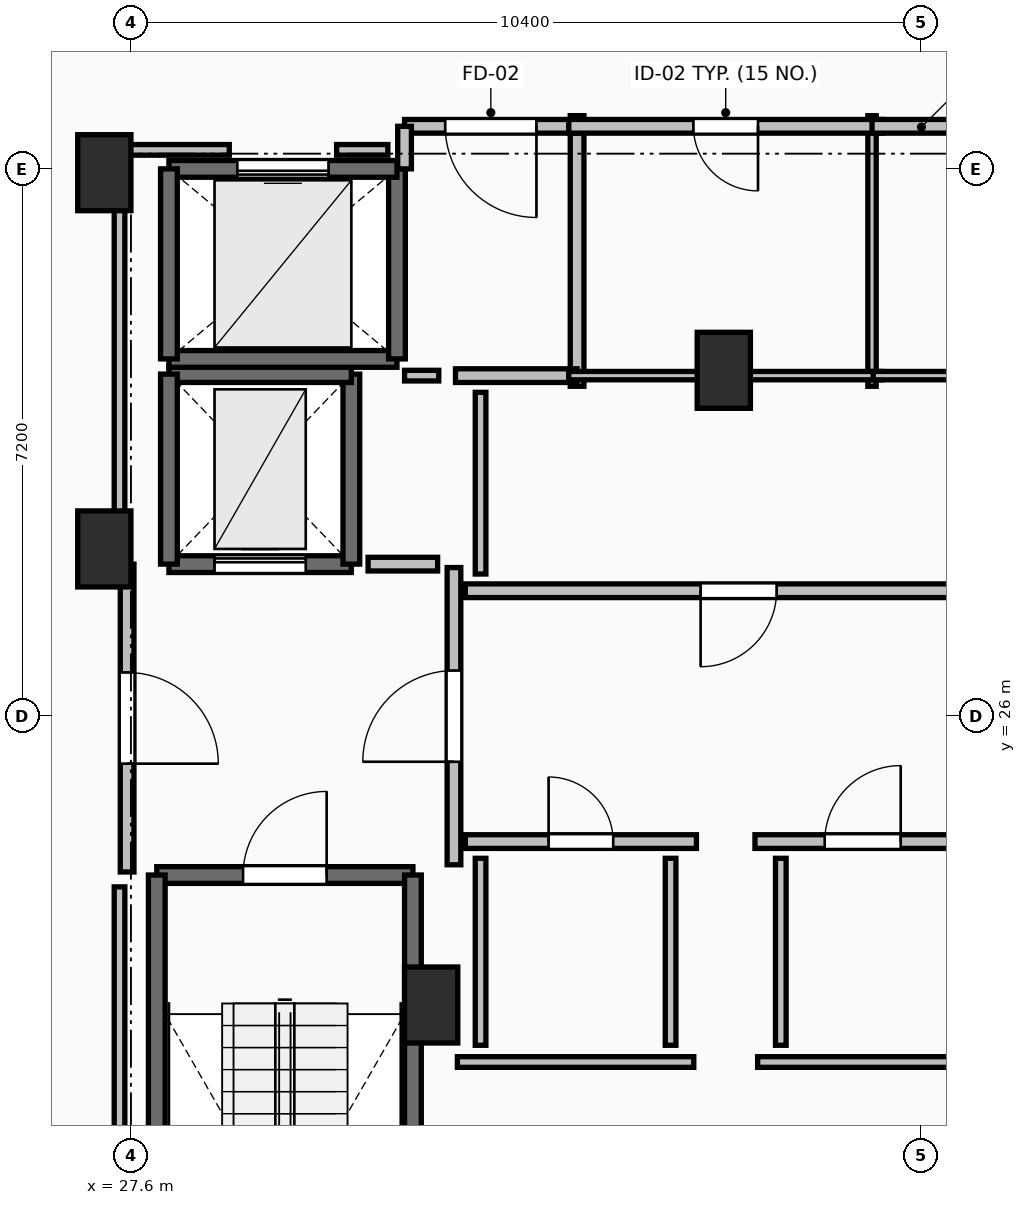
"""IFC4 building model, lengths in metres.
Left out: names, types, materials, properties, quantities, classifications, styles, units other than length and angle.
Written with IfcOpenShell. Run it as: python <this file> out.ifc"""

import sys

from ifc_helpers import new_model, si_unit, direction, frame, frame_2d, origin, origin_2d, place, context, subcontext, project, spatial, rectangle, extrude, element, fill, save


model = new_model("IFC4")
c1 = context("Model", 3, precision=1e-05, world=origin(), true_north=direction((0.0, 1.0)))
c2 = subcontext(c1, "Body", "Model", "MODEL_VIEW")
j1 = project(units=[si_unit("LENGTHUNIT", "METRE"), si_unit("PLANEANGLEUNIT", "RADIAN")], contexts=[c1])
p1 = place(None, origin())
s1 = spatial("IfcSite", under=j1, at=p1, CompositionType="ELEMENT")
p2 = place(p1, origin())
s2 = spatial("IfcBuilding", under=s1, at=p2, CompositionType="ELEMENT")
p3 = place(p2, frame((0.0, 0.0, 237.8)))
s3 = spatial("IfcBuildingStorey", under=s2, at=p3, CompositionType="ELEMENT", Elevation=237.8)
for number, where, z_axis, x_axis in (
    (1, (27.25, 28.2, 0.0), (0.0, 0.0, 1.0), (1.0, 0.0, 0.0)),
    (2, (27.25, 33.15, 0.0), (0.0, 0.0, 1.0), (1.0, 0.0, 0.0)),
    (3, (31.55, 22.2, 0.0), (0.0, 0.0, 1.0), (1.0, 0.0, 0.0)),
    (4, (35.4, 30.55, 0.0), (0.0, 0.0, 1.0), (1.0, 0.0, 0.0)),
):
    element("IfcColumn", number, at=place(p3, frame(where, z_axis=z_axis, x_axis=x_axis)), inside=s3, PredefinedType="PILASTER", context=c2, shape_type="SweptSolid", body=[
        extrude(rectangle(XDim=0.7, YDim=1.0, at=origin_2d()), origin(), (0.0, 0.0, 1.0), 3.55),
    ])
p4 = place(p3, frame((27.94, 23.91, 0.0), z_axis=(0.0, 0.0, 1.0), x_axis=(1.0, 0.0, 0.0)))
e5 = element("IfcWall", 5, at=p4, inside=s3, PredefinedType="SOLIDWALL", context=c2, shape_type="SweptSolid", body=[
    extrude(rectangle(XDim=3.37, YDim=0.22, at=frame_2d((1.685, 0.0))), origin(), (0.0, 0.0, 1.0), 3.29),
])
p5 = place(p4, frame((1.135, 0.0, 0.0)))
e6 = element("IfcOpeningElement", 6, at=p5, cuts=e5, PredefinedType="OPENING", context=c2, shape_type="SweptSolid", body=[
    extrude(rectangle(XDim=1.1, YDim=2.15, at=frame_2d((0.55, 1.075))), frame((0.0, 0.125, 0.0), z_axis=(0.0, -1.0, 0.0), x_axis=(1.0, 0.0, 0.0)), (0.0, 0.0, 1.0), 0.25),
])
for number, where, z_axis, x_axis in (
    (7, (31.31, 23.91, 0.0), (0.0, 0.0, 1.0), (0.0, -1.0, 0.0)),
    (8, (27.94, 16.49, 0.0), (0.0, 0.0, 1.0), (0.0, 1.0, 0.0)),
):
    element("IfcWall", number, at=place(p3, frame(where, z_axis=z_axis, x_axis=x_axis)), inside=s3, PredefinedType="SOLIDWALL", context=c2, shape_type="SweptSolid", body=[
        extrude(rectangle(XDim=7.42, YDim=0.22, at=frame_2d((3.71, 0.0))), origin(), (0.0, 0.0, 1.0), 3.29),
    ])
p6 = place(p3, frame((28.1, 28.0, 0.0), z_axis=(0.0, 0.0, 1.0), x_axis=(1.0, 0.0, 0.0)))
e9 = element("IfcWall", 9, at=p6, inside=s3, PredefinedType="SHEAR", context=c2, shape_type="SweptSolid", body=[
    extrude(rectangle(XDim=2.4, YDim=0.22, at=frame_2d((1.2, 0.0))), origin(), (0.0, 0.0, 1.0), 3.29),
])
p7 = place(p6, frame((0.6, 0.0, 0.0)))
e10 = element("IfcOpeningElement", 10, at=p7, cuts=e9, PredefinedType="OPENING", context=c2, shape_type="SweptSolid", body=[
    extrude(rectangle(XDim=1.2, YDim=2.2, at=frame_2d((0.6, 1.1))), frame((0.0, 0.125, 0.0), z_axis=(0.0, -1.0, 0.0), x_axis=(1.0, 0.0, 0.0)), (0.0, 0.0, 1.0), 0.25),
])
p8 = place(p3, frame((30.5, 28.0, 0.0), z_axis=(0.0, 0.0, 1.0), x_axis=(0.0, 1.0, 0.0)))
e11 = element("IfcWall", 11, at=p8, inside=s3, PredefinedType="SHEAR", context=c2, shape_type="SweptSolid", body=[
    extrude(rectangle(XDim=2.5, YDim=0.22, at=frame_2d((1.25, 0.0))), origin(), (0.0, 0.0, 1.0), 3.29),
])
p9 = place(p3, frame((30.5, 30.5, 0.0), z_axis=(0.0, 0.0, 1.0), x_axis=(-1.0, 0.0, 0.0)))
e12 = element("IfcWall", 12, at=p9, inside=s3, PredefinedType="SHEAR", context=c2, shape_type="SweptSolid", body=[
    extrude(rectangle(XDim=2.4, YDim=0.22, at=frame_2d((1.2, 0.0))), origin(), (0.0, 0.0, 1.0), 3.29),
])
p10 = place(p3, frame((28.1, 30.5, 0.0), z_axis=(0.0, 0.0, 1.0), x_axis=(0.0, -1.0, 0.0)))
e13 = element("IfcWall", 13, at=p10, inside=s3, PredefinedType="SHEAR", context=c2, shape_type="SweptSolid", body=[
    extrude(rectangle(XDim=2.5, YDim=0.22, at=frame_2d((1.25, 0.0))), origin(), (0.0, 0.0, 1.0), 3.29),
])
p11 = place(p3, frame((28.1, 30.7, 0.0), z_axis=(0.0, 0.0, 1.0), x_axis=(1.0, 0.0, 0.0)))
e14 = element("IfcWall", 14, at=p11, inside=s3, PredefinedType="SOLIDWALL", context=c2, shape_type="SweptSolid", body=[
    extrude(rectangle(XDim=3.0, YDim=0.22, at=frame_2d((1.5, 0.0))), origin(), (0.0, 0.0, 1.0), 3.29),
])
p12 = place(p3, frame((31.1, 30.7, 0.0), z_axis=(0.0, 0.0, 1.0), x_axis=(0.0, 1.0, 0.0)))
e15 = element("IfcWall", 15, at=p12, inside=s3, PredefinedType="SOLIDWALL", context=c2, shape_type="SweptSolid", body=[
    extrude(rectangle(XDim=2.5, YDim=0.22, at=frame_2d((1.25, 0.0))), origin(), (0.0, 0.0, 1.0), 3.29),
])
p13 = place(p3, frame((31.1, 33.2, 0.0), z_axis=(0.0, 0.0, 1.0), x_axis=(-1.0, 0.0, 0.0)))
e16 = element("IfcWall", 16, at=p13, inside=s3, PredefinedType="SOLIDWALL", context=c2, shape_type="SweptSolid", body=[
    extrude(rectangle(XDim=3.0, YDim=0.22, at=frame_2d((1.5, 0.0))), origin(), (0.0, 0.0, 1.0), 3.29),
])
p14 = place(p13, frame((0.9, 0.0, 0.0)))
e17 = element("IfcOpeningElement", 17, at=p14, cuts=e16, PredefinedType="OPENING", context=c2, shape_type="SweptSolid", body=[
    extrude(rectangle(XDim=1.2, YDim=2.2, at=frame_2d((0.6, 1.1))), frame((0.0, 0.125, 0.0), z_axis=(0.0, -1.0, 0.0), x_axis=(1.0, 0.0, 0.0)), (0.0, 0.0, 1.0), 0.25),
])
p15 = place(p3, frame((28.1, 33.2, 0.0), z_axis=(0.0, 0.0, 1.0), x_axis=(0.0, -1.0, 0.0)))
e18 = element("IfcWall", 18, at=p15, inside=s3, PredefinedType="SOLIDWALL", context=c2, shape_type="SweptSolid", body=[
    extrude(rectangle(XDim=2.5, YDim=0.22, at=frame_2d((1.25, 0.0))), origin(), (0.0, 0.0, 1.0), 3.29),
])
p16 = place(p3, frame((31.85, 24.045, 0.0), z_axis=(0.0, 0.0, 1.0), x_axis=(0.0, 1.0, 0.0)))
e19 = element("IfcWall", 19, at=p16, inside=s3, PredefinedType="PARTITIONING", context=c2, shape_type="SweptSolid", body=[
    extrude(rectangle(XDim=3.91, YDim=0.18, at=frame_2d((1.955, 0.0))), origin(), (0.0, 0.0, 1.0), 3.29),
])
p17 = place(p16, frame((1.355, 0.0, 0.0)))
e20 = element("IfcOpeningElement", 20, at=p17, cuts=e19, PredefinedType="OPENING", context=c2, shape_type="SweptSolid", body=[
    extrude(rectangle(XDim=1.2, YDim=2.15, at=frame_2d((0.6, 1.075))), frame((0.0, 0.105, 0.0), z_axis=(0.0, -1.0, 0.0), x_axis=(1.0, 0.0, 0.0)), (0.0, 0.0, 1.0), 0.21),
])
p18 = place(p3, frame((27.55, 28.0, 0.0), z_axis=(0.0, 0.0, 1.0), x_axis=(0.0, -1.0, 0.0)))
e21 = element("IfcWall", 21, at=p18, inside=s3, PredefinedType="PARTITIONING", context=c2, shape_type="SweptSolid", body=[
    extrude(rectangle(XDim=4.05, YDim=0.18, at=frame_2d((2.025, 0.0))), origin(), (0.0, 0.0, 1.0), 3.29),
])
p19 = place(p18, frame((1.425, 0.0, 0.0)))
e22 = element("IfcOpeningElement", 22, at=p19, cuts=e21, PredefinedType="OPENING", context=c2, shape_type="SweptSolid", body=[
    extrude(rectangle(XDim=1.2, YDim=2.15, at=frame_2d((0.6, 1.075))), frame((0.0, 0.105, 0.0), z_axis=(0.0, -1.0, 0.0), x_axis=(1.0, 0.0, 0.0)), (0.0, 0.0, 1.0), 0.21),
])
p20 = place(p3, frame((33.47, 30.34, 0.0), z_axis=(0.0, 0.0, 1.0), x_axis=(0.0, 1.0, 0.0)))
e23 = element("IfcWall", 23, at=p20, inside=s3, PredefinedType="PARTITIONING", context=c2, shape_type="SweptSolid", body=[
    extrude(rectangle(XDim=3.56, YDim=0.18, at=frame_2d((1.78, 0.0))), origin(), (0.0, 0.0, 1.0), 3.29),
])
p21 = place(p3, frame((31.87, 30.48, 0.0), z_axis=(0.0, 0.0, 1.0), x_axis=(1.0, 0.0, 0.0)))
e24 = element("IfcWall", 24, at=p21, inside=s3, PredefinedType="PARTITIONING", context=c2, shape_type="SweptSolid", body=[
    extrude(rectangle(XDim=1.6, YDim=0.18, at=frame_2d((0.8, 0.0))), origin(), (0.0, 0.0, 1.0), 3.29),
])
p22 = place(p3, frame((33.47, 33.76, 0.0), z_axis=(0.0, 0.0, 1.0), x_axis=(-1.0, 0.0, 0.0)))
e25 = element("IfcWall", 25, at=p22, inside=s3, PredefinedType="PARTITIONING", context=c2, shape_type="SweptSolid", body=[
    extrude(rectangle(XDim=2.27, YDim=0.18, at=frame_2d((1.135, 0.0))), origin(), (0.0, 0.0, 1.0), 3.29),
])
p23 = place(p22, frame((0.535, 0.0, 0.0)))
e26 = element("IfcOpeningElement", 26, at=p23, cuts=e25, PredefinedType="OPENING", context=c2, shape_type="SweptSolid", body=[
    extrude(rectangle(XDim=1.2, YDim=2.15, at=frame_2d((0.6, 1.075))), frame((0.0, 0.105, 0.0), z_axis=(0.0, -1.0, 0.0), x_axis=(1.0, 0.0, 0.0)), (0.0, 0.0, 1.0), 0.21),
])
p24 = place(p3, frame((31.2, 33.76, 0.0), z_axis=(0.0, 0.0, 1.0), x_axis=(0.0, -1.0, 0.0)))
e27 = element("IfcWall", 27, at=p24, inside=s3, PredefinedType="PARTITIONING", context=c2, shape_type="SweptSolid", body=[
    extrude(rectangle(XDim=0.56, YDim=0.18, at=frame_2d((0.28, 0.0))), origin(), (0.0, 0.0, 1.0), 3.29),
])
p25 = place(p3, frame((39.19, 27.65, 0.0), z_axis=(0.0, 0.0, 1.0), x_axis=(-1.0, 0.0, 0.0)))
e28 = element("IfcWall", 28, at=p25, inside=s3, PredefinedType="PARTITIONING", context=c2, shape_type="SweptSolid", body=[
    extrude(rectangle(XDim=7.19, YDim=0.18, at=frame_2d((3.595, 0.0))), origin(), (0.0, 0.0, 1.0), 3.29),
])
p26 = place(p25, frame((3.095, 0.0, 0.0)))
e29 = element("IfcOpeningElement", 29, at=p26, cuts=e28, PredefinedType="OPENING", context=c2, shape_type="SweptSolid", body=[
    extrude(rectangle(XDim=1.0, YDim=2.15, at=frame_2d((0.5, 1.075))), frame((0.0, 0.105, 0.0), z_axis=(0.0, -1.0, 0.0), x_axis=(1.0, 0.0, 0.0)), (0.0, 0.0, 1.0), 0.21),
])
p27 = place(p3, frame((32.0, 24.35, 0.0), z_axis=(0.0, 0.0, 1.0), x_axis=(1.0, 0.0, 0.0)))
e30 = element("IfcWall", 30, at=p27, inside=s3, PredefinedType="PARTITIONING", context=c2, shape_type="SweptSolid", body=[
    extrude(rectangle(XDim=3.04, YDim=0.18, at=frame_2d((1.52, 0.0))), origin(), (0.0, 0.0, 1.0), 3.29),
])
p28 = place(p27, frame((1.095, 0.0, 0.0)))
e31 = element("IfcOpeningElement", 31, at=p28, cuts=e30, PredefinedType="OPENING", context=c2, shape_type="SweptSolid", body=[
    extrude(rectangle(XDim=0.85, YDim=2.1, at=frame_2d((0.425, 1.05))), frame((0.0, 0.105, 0.0), z_axis=(0.0, -1.0, 0.0), x_axis=(1.0, 0.0, 0.0)), (0.0, 0.0, 1.0), 0.21),
])
p29 = place(p3, frame((35.81, 24.35, 0.0), z_axis=(0.0, 0.0, 1.0), x_axis=(1.0, 0.0, 0.0)))
e32 = element("IfcWall", 32, at=p29, inside=s3, PredefinedType="PARTITIONING", context=c2, shape_type="SweptSolid", body=[
    extrude(rectangle(XDim=2.835, YDim=0.18, at=frame_2d((1.417, 0.0))), origin(), (0.0, 0.0, 1.0), 3.29),
])
p30 = place(p29, frame((0.917, 0.0, 0.0)))
e33 = element("IfcOpeningElement", 33, at=p30, cuts=e32, PredefinedType="OPENING", context=c2, shape_type="SweptSolid", body=[
    extrude(rectangle(XDim=1.0, YDim=2.15, at=frame_2d((0.5, 1.075))), frame((0.0, 0.105, 0.0), z_axis=(0.0, -1.0, 0.0), x_axis=(1.0, 0.0, 0.0)), (0.0, 0.0, 1.0), 0.21),
])
p31 = place(p3, frame((37.35, 30.34, 0.0), z_axis=(0.0, 0.0, 1.0), x_axis=(0.0, 1.0, 0.0)))
e34 = element("IfcWall", 34, at=p31, inside=s3, PredefinedType="PARTITIONING", context=c2, shape_type="SweptSolid", body=[
    extrude(rectangle(XDim=3.56, YDim=0.11, at=frame_2d((1.78, 0.0))), origin(), (0.0, 0.0, 1.0), 2.482),
])
p32 = place(p3, frame((33.36, 30.48, 0.0), z_axis=(0.0, 0.0, 1.0), x_axis=(1.0, 0.0, 0.0)))
e35 = element("IfcWall", 35, at=p32, inside=s3, PredefinedType="PARTITIONING", context=c2, shape_type="SweptSolid", body=[
    extrude(rectangle(XDim=4.115, YDim=0.11, at=frame_2d((2.058, 0.0))), origin(), (0.0, 0.0, 1.0), 2.482),
])
p33 = place(p3, frame((37.49, 33.76, 0.0), z_axis=(0.0, 0.0, 1.0), x_axis=(-1.0, 0.0, 0.0)))
e36 = element("IfcWall", 36, at=p33, inside=s3, PredefinedType="PARTITIONING", context=c2, shape_type="SweptSolid", body=[
    extrude(rectangle(XDim=4.13, YDim=0.18, at=frame_2d((2.065, 0.0))), origin(), (0.0, 0.0, 1.0), 3.29),
])
p34 = place(p33, frame((1.64, 0.0, 0.0)))
e37 = element("IfcOpeningElement", 37, at=p34, cuts=e36, PredefinedType="OPENING", context=c2, shape_type="SweptSolid", body=[
    extrude(rectangle(XDim=0.85, YDim=2.1, at=frame_2d((0.425, 1.05))), frame((0.0, 0.105, 0.0), z_axis=(0.0, -1.0, 0.0), x_axis=(1.0, 0.0, 0.0)), (0.0, 0.0, 1.0), 0.21),
])
p35 = place(p3, frame((37.365, 30.48, 0.0), z_axis=(0.0, 0.0, 1.0), x_axis=(1.0, 0.0, 0.0)))
e38 = element("IfcWall", 38, at=p35, inside=s3, PredefinedType="PARTITIONING", context=c2, shape_type="SweptSolid", body=[
    extrude(rectangle(XDim=1.955, YDim=0.11, at=frame_2d((0.978, 0.0))), origin(), (0.0, 0.0, 1.0), 2.482),
])
p36 = place(p3, frame((44.26, 33.76, 0.0), z_axis=(0.0, 0.0, 1.0), x_axis=(-1.0, 0.0, 0.0)))
e39 = element("IfcWall", 39, at=p36, inside=s3, PredefinedType="PARTITIONING", context=c2, shape_type="SweptSolid", body=[
    extrude(rectangle(XDim=6.91, YDim=0.18, at=frame_2d((3.455, 0.0))), origin(), (0.0, 0.0, 1.0), 3.29),
])
p37 = place(p36, frame((3.03, 0.0, 0.0)))
e40 = element("IfcOpeningElement", 40, at=p37, cuts=e39, PredefinedType="OPENING", context=c2, shape_type="SweptSolid", body=[
    extrude(rectangle(XDim=0.85, YDim=2.1, at=frame_2d((0.425, 1.05))), frame((0.0, 0.105, 0.0), z_axis=(0.0, -1.0, 0.0), x_axis=(1.0, 0.0, 0.0)), (0.0, 0.0, 1.0), 0.21),
])
p38 = place(p3, frame((35.005, 21.45, 0.0), z_axis=(0.0, 0.0, 1.0), x_axis=(-1.0, 0.0, 0.0)))
e41 = element("IfcWall", 41, at=p38, inside=s3, PredefinedType="PARTITIONING", context=c2, shape_type="SweptSolid", body=[
    extrude(rectangle(XDim=3.11, YDim=0.14, at=frame_2d((1.555, 0.0))), origin(), (0.0, 0.0, 1.0), 3.29),
])
p39 = place(p3, frame((38.8, 21.45, 0.0), z_axis=(0.0, 0.0, 1.0), x_axis=(-1.0, 0.0, 0.0)))
e42 = element("IfcWall", 42, at=p39, inside=s3, PredefinedType="PARTITIONING", context=c2, shape_type="SweptSolid", body=[
    extrude(rectangle(XDim=2.955, YDim=0.14, at=frame_2d((1.478, 0.0))), origin(), (0.0, 0.0, 1.0), 3.29),
])
p40 = place(p3, frame((31.635, 28.0, 0.0), z_axis=(0.0, 0.0, 1.0), x_axis=(-1.0, 0.0, 0.0)))
e43 = element("IfcWall", 43, at=p40, inside=s3, PredefinedType="PARTITIONING", context=c2, shape_type="SweptSolid", body=[
    extrude(rectangle(XDim=0.915, YDim=0.18, at=frame_2d((0.458, 0.0))), origin(), (0.0, 0.0, 1.0), 3.29),
])
p41 = place(p3, frame((31.2, 30.48, 0.0), z_axis=(0.0, 0.0, 1.0), x_axis=(1.0, 0.0, 0.0)))
e44 = element("IfcWall", 44, at=p41, inside=s3, PredefinedType="PARTITIONING", context=c2, shape_type="SweptSolid", body=[
    extrude(rectangle(XDim=0.45, YDim=0.14, at=frame_2d((0.225, 0.0))), origin(), (0.0, 0.0, 1.0), 3.29),
])
p42 = place(p3, frame((32.2, 30.26, 0.0), z_axis=(0.0, 0.0, 1.0), x_axis=(0.0, -1.0, 0.0)))
e45 = element("IfcWall", 45, at=p42, inside=s3, PredefinedType="PARTITIONING", context=c2, shape_type="SweptSolid", body=[
    extrude(rectangle(XDim=2.39, YDim=0.14, at=frame_2d((1.195, 0.0))), origin(), (0.0, 0.0, 1.0), 3.29),
])
for number, where, z_axis, x_axis in (
    (46, (32.2, 24.13, 0.0), (0.0, 0.0, 1.0), (0.0, -1.0, 0.0)),
    (47, (34.7, 21.67, 0.0), (0.0, 0.0, 1.0), (0.0, 1.0, 0.0)),
    (48, (36.15, 24.13, 0.0), (0.0, 0.0, 1.0), (0.0, -1.0, 0.0)),
):
    element("IfcWall", number, at=place(p3, frame(where, z_axis=z_axis, x_axis=x_axis)), inside=s3, PredefinedType="PARTITIONING", context=c2, shape_type="SweptSolid", body=[
        extrude(rectangle(XDim=2.46, YDim=0.14, at=frame_2d((1.23, 0.0))), origin(), (0.0, 0.0, 1.0), 2.482),
    ])
p43 = place(p3, frame((30.98, 33.45, 0.0), z_axis=(0.0, 0.0, 1.0), x_axis=(-1.0, 0.0, 0.0)))
e49 = element("IfcWall", 49, at=p43, inside=s3, PredefinedType="PARTITIONING", context=c2, shape_type="SweptSolid", body=[
    extrude(rectangle(XDim=0.674, YDim=0.14, at=frame_2d((0.337, 0.0))), origin(), (0.0, 0.0, 1.0), 3.29),
])
p44 = place(p3, frame((28.894, 33.45, 0.0), z_axis=(0.0, 0.0, 1.0), x_axis=(-1.0, 0.0, 0.0)))
e50 = element("IfcWall", 50, at=p44, inside=s3, PredefinedType="PARTITIONING", context=c2, shape_type="SweptSolid", body=[
    extrude(rectangle(XDim=1.444, YDim=0.14, at=frame_2d((0.722, 0.0))), origin(), (0.0, 0.0, 1.0), 2.482),
])
p45 = place(p3, frame((27.45, 33.45, 0.0), z_axis=(0.0, 0.0, 1.0), x_axis=(0.0, -1.0, 0.0)))
e51 = element("IfcWall", 51, at=p45, inside=s3, PredefinedType="PARTITIONING", context=c2, shape_type="SweptSolid", body=[
    extrude(rectangle(XDim=5.254, YDim=0.14, at=frame_2d((2.627, 0.0))), origin(), (0.0, 0.0, 1.0), 2.482),
])
p46 = place(p3, frame((27.45, 23.754, 0.0), z_axis=(0.0, 0.0, 1.0), x_axis=(0.0, -1.0, 0.0)))
e52 = element("IfcWall", 52, at=p46, inside=s3, PredefinedType="PARTITIONING", context=c2, shape_type="SweptSolid", body=[
    extrude(rectangle(XDim=7.514, YDim=0.14, at=frame_2d((3.757, 0.0))), origin(), (0.0, 0.0, 1.0), 2.482),
])
p47 = place(p5, origin())
e53 = element("IfcDoor", 53, at=p47, inside=s3, OperationType="SINGLE_SWING_RIGHT", PredefinedType="DOOR", context=c2, shape_type="SweptSolid", body=[
    extrude(rectangle(XDim=1.1, YDim=2.15, at=frame_2d((0.55, 1.075))), frame((0.0, 0.025, 0.0), z_axis=(0.0, -1.0, 0.0), x_axis=(1.0, 0.0, 0.0)), (0.0, 0.0, 1.0), 0.05),
])
fill(e6, e53)
p48 = place(p7, origin())
e54 = element("IfcDoor", 54, at=p48, inside=s3, OperationType="SLIDING_TO_LEFT", PredefinedType="DOOR", context=c2, shape_type="SweptSolid", body=[
    extrude(rectangle(XDim=1.2, YDim=2.2, at=frame_2d((0.6, 1.1))), frame((0.0, 0.025, 0.0), z_axis=(0.0, -1.0, 0.0), x_axis=(1.0, 0.0, 0.0)), (0.0, 0.0, 1.0), 0.05),
])
fill(e10, e54)
p49 = place(p14, origin())
e55 = element("IfcDoor", 55, at=p49, inside=s3, OperationType="SLIDING_TO_LEFT", PredefinedType="DOOR", context=c2, shape_type="SweptSolid", body=[
    extrude(rectangle(XDim=1.2, YDim=2.2, at=frame_2d((0.6, 1.1))), frame((0.0, 0.025, 0.0), z_axis=(0.0, -1.0, 0.0), x_axis=(1.0, 0.0, 0.0)), (0.0, 0.0, 1.0), 0.05),
])
fill(e17, e55)
p50 = place(p17, origin())
e56 = element("IfcDoor", 56, at=p50, inside=s3, OperationType="SINGLE_SWING_LEFT", PredefinedType="DOOR", context=c2, shape_type="SweptSolid", body=[
    extrude(rectangle(XDim=1.2, YDim=2.15, at=frame_2d((0.6, 1.075))), frame((0.0, 0.025, 0.0), z_axis=(0.0, -1.0, 0.0), x_axis=(1.0, 0.0, 0.0)), (0.0, 0.0, 1.0), 0.05),
])
fill(e20, e56)
p51 = place(p19, origin())
e57 = element("IfcDoor", 57, at=p51, inside=s3, OperationType="SINGLE_SWING_RIGHT", PredefinedType="DOOR", context=c2, shape_type="SweptSolid", body=[
    extrude(rectangle(XDim=1.2, YDim=2.15, at=frame_2d((0.6, 1.075))), frame((0.0, 0.025, 0.0), z_axis=(0.0, -1.0, 0.0), x_axis=(1.0, 0.0, 0.0)), (0.0, 0.0, 1.0), 0.05),
])
fill(e22, e57)
p52 = place(p23, origin())
e58 = element("IfcDoor", 58, at=p52, inside=s3, OperationType="SINGLE_SWING_LEFT", PredefinedType="DOOR", context=c2, shape_type="SweptSolid", body=[
    extrude(rectangle(XDim=1.2, YDim=2.15, at=frame_2d((0.6, 1.075))), frame((0.0, 0.025, 0.0), z_axis=(0.0, -1.0, 0.0), x_axis=(1.0, 0.0, 0.0)), (0.0, 0.0, 1.0), 0.05),
])
fill(e26, e58)
p53 = place(p26, origin())
e59 = element("IfcDoor", 59, at=p53, inside=s3, OperationType="SINGLE_SWING_RIGHT", PredefinedType="DOOR", context=c2, shape_type="SweptSolid", body=[
    extrude(rectangle(XDim=1.0, YDim=2.15, at=frame_2d((0.5, 1.075))), frame((0.0, 0.025, 0.0), z_axis=(0.0, -1.0, 0.0), x_axis=(1.0, 0.0, 0.0)), (0.0, 0.0, 1.0), 0.05),
])
fill(e29, e59)
p54 = place(p28, origin())
e60 = element("IfcDoor", 60, at=p54, inside=s3, OperationType="SINGLE_SWING_LEFT", PredefinedType="DOOR", context=c2, shape_type="SweptSolid", body=[
    extrude(rectangle(XDim=0.85, YDim=2.1, at=frame_2d((0.425, 1.05))), frame((0.0, 0.025, 0.0), z_axis=(0.0, -1.0, 0.0), x_axis=(1.0, 0.0, 0.0)), (0.0, 0.0, 1.0), 0.05),
])
fill(e31, e60)
p55 = place(p30, origin())
e61 = element("IfcDoor", 61, at=p55, inside=s3, OperationType="SINGLE_SWING_RIGHT", PredefinedType="DOOR", context=c2, shape_type="SweptSolid", body=[
    extrude(rectangle(XDim=1.0, YDim=2.15, at=frame_2d((0.5, 1.075))), frame((0.0, 0.025, 0.0), z_axis=(0.0, -1.0, 0.0), x_axis=(1.0, 0.0, 0.0)), (0.0, 0.0, 1.0), 0.05),
])
fill(e33, e61)
p56 = place(p34, origin())
e62 = element("IfcDoor", 62, at=p56, inside=s3, OperationType="SINGLE_SWING_LEFT", PredefinedType="DOOR", context=c2, shape_type="SweptSolid", body=[
    extrude(rectangle(XDim=0.85, YDim=2.1, at=frame_2d((0.425, 1.05))), frame((0.0, 0.025, 0.0), z_axis=(0.0, -1.0, 0.0), x_axis=(1.0, 0.0, 0.0)), (0.0, 0.0, 1.0), 0.05),
])
fill(e37, e62)
save(model, sys.argv[1])
